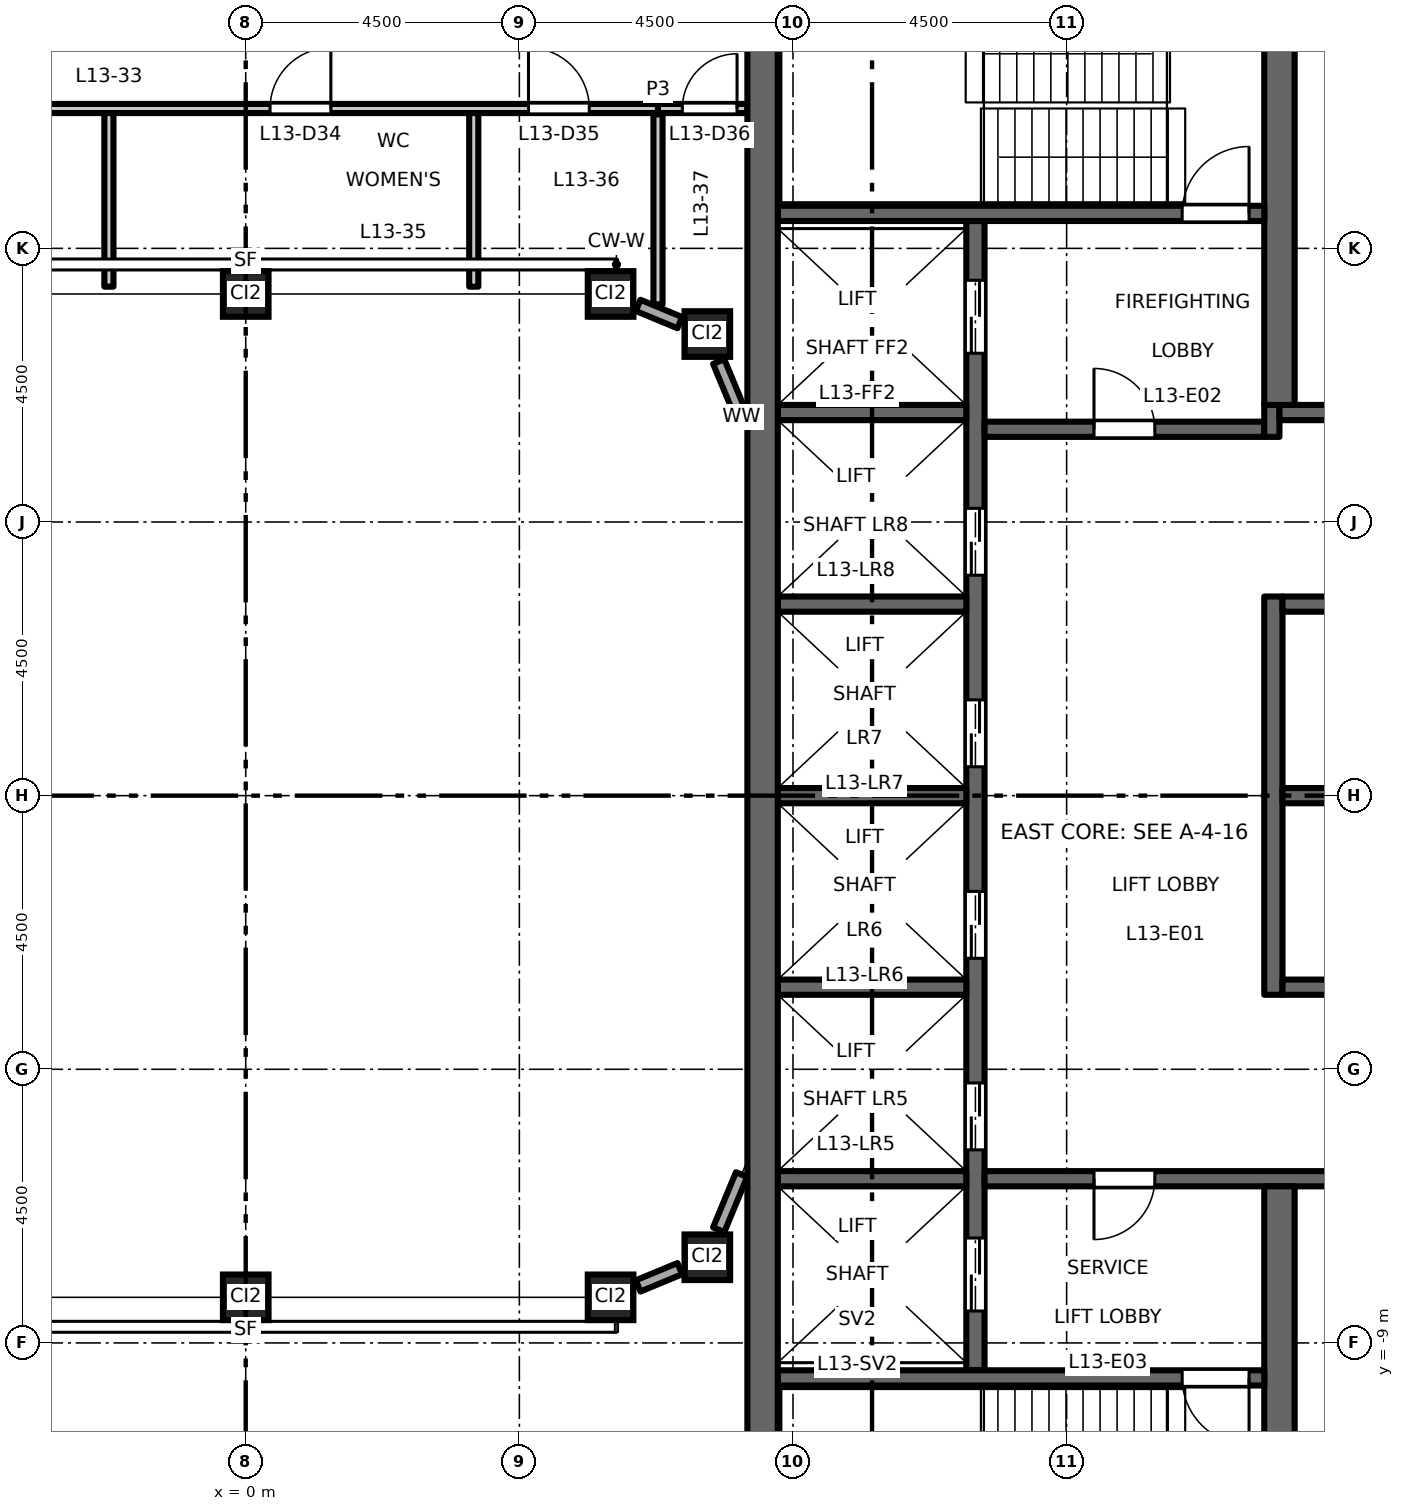
"""IFC4 building model, lengths in metres.
Left out: names, types, materials, properties, quantities, classifications, styles, units other than length and angle.
Written with IfcOpenShell. Run it as: python <this file> out.ifc"""

import sys

from ifc_helpers import new_model, si_unit, direction, frame, frame_2d, origin, origin_2d, place, context, subcontext, project, spatial, rectangle, hollow_rectangle, extrude, element, fill, save


model = new_model("IFC4")
c1 = context("Model", 3, precision=1e-05, world=origin(), true_north=direction((0.0, 1.0)))
c2 = subcontext(c1, "Body", "Model", "MODEL_VIEW")
j1 = project(units=[si_unit("LENGTHUNIT", "METRE"), si_unit("PLANEANGLEUNIT", "RADIAN")], contexts=[c1])
p1 = place(None, origin())
s1 = spatial("IfcSite", under=j1, at=p1, CompositionType="ELEMENT")
p2 = place(p1, origin())
s2 = spatial("IfcBuilding", under=s1, at=p2, CompositionType="ELEMENT")
p3 = place(p2, frame((0.0, 0.0, 62.7)))
s3 = spatial("IfcBuildingStorey", under=s2, at=p3, CompositionType="ELEMENT", Elevation=62.7)
for number, where, z_axis, x_axis in (
    (1, (0.0, -8.25, 0.0), (0.0, 0.0, 1.0), (1.0, 0.0, 0.0)),
    (2, (6.0, -8.25, 0.0), (0.0, 0.0, 1.0), (1.0, 0.0, 0.0)),
    (3, (7.591, -7.591, 0.0), (0.0, 0.0, 1.0), (1.0, 0.0, 0.0)),
    (4, (0.0, 8.25, 0.0), (0.0, 0.0, 1.0), (1.0, 0.0, 0.0)),
    (5, (6.0, 8.25, 0.0), (0.0, 0.0, 1.0), (1.0, 0.0, 0.0)),
    (6, (7.591, 7.591, 0.0), (0.0, 0.0, 1.0), (1.0, 0.0, 0.0)),
):
    element("IfcColumn", number, at=place(p3, frame(where, z_axis=z_axis, x_axis=x_axis)), inside=s3, PredefinedType="COLUMN", context=c2, shape_type="SweptSolid", body=[
        extrude(hollow_rectangle(XDim=0.75, YDim=0.75, WallThickness=0.045, at=origin_2d()), origin(), (0.0, 0.0, 1.0), 4.5),
    ])
p4 = place(p3, frame((12.0, -9.45, 0.0), z_axis=(0.0, 0.0, 1.0), x_axis=(0.0, 1.0, 0.0)))
e7 = element("IfcWall", 7, at=p4, inside=s3, PredefinedType="SHEAR", context=c2, shape_type="SweptSolid", body=[
    extrude(rectangle(XDim=18.9, YDim=0.3, at=frame_2d((9.45, 0.0))), origin(), (0.0, 0.0, 1.0), 4.35),
])
p5 = place(p4, frame((3.625, 0.0, 0.0)))
e8 = element("IfcOpeningElement", 8, at=p5, cuts=e7, PredefinedType="OPENING", context=c2, shape_type="SweptSolid", body=[
    extrude(rectangle(XDim=1.1, YDim=2.1, at=frame_2d((0.55, 1.05))), frame((0.0, 0.16, 0.0), z_axis=(0.0, -1.0, 0.0), x_axis=(1.0, 0.0, 0.0)), (0.0, 0.0, 1.0), 0.32),
])
p6 = place(p4, frame((6.775, 0.0, 0.0)))
e9 = element("IfcOpeningElement", 9, at=p6, cuts=e7, PredefinedType="OPENING", context=c2, shape_type="SweptSolid", body=[
    extrude(rectangle(XDim=1.1, YDim=2.1, at=frame_2d((0.55, 1.05))), frame((0.0, 0.16, 0.0), z_axis=(0.0, -1.0, 0.0), x_axis=(1.0, 0.0, 0.0)), (0.0, 0.0, 1.0), 0.32),
])
p7 = place(p4, frame((9.925, 0.0, 0.0)))
e10 = element("IfcOpeningElement", 10, at=p7, cuts=e7, PredefinedType="OPENING", context=c2, shape_type="SweptSolid", body=[
    extrude(rectangle(XDim=1.1, YDim=2.1, at=frame_2d((0.55, 1.05))), frame((0.0, 0.16, 0.0), z_axis=(0.0, -1.0, 0.0), x_axis=(1.0, 0.0, 0.0)), (0.0, 0.0, 1.0), 0.32),
])
p8 = place(p4, frame((13.075, 0.0, 0.0)))
e11 = element("IfcOpeningElement", 11, at=p8, cuts=e7, PredefinedType="OPENING", context=c2, shape_type="SweptSolid", body=[
    extrude(rectangle(XDim=1.1, YDim=2.1, at=frame_2d((0.55, 1.05))), frame((0.0, 0.16, 0.0), z_axis=(0.0, -1.0, 0.0), x_axis=(1.0, 0.0, 0.0)), (0.0, 0.0, 1.0), 0.32),
])
p9 = place(p4, frame((16.725, 0.0, 0.0)))
e12 = element("IfcOpeningElement", 12, at=p9, cuts=e7, PredefinedType="OPENING", context=c2, shape_type="SweptSolid", body=[
    extrude(rectangle(XDim=1.2, YDim=2.1, at=frame_2d((0.6, 1.05))), frame((0.0, 0.16, 0.0), z_axis=(0.0, -1.0, 0.0), x_axis=(1.0, 0.0, 0.0)), (0.0, 0.0, 1.0), 0.32),
])
p10 = place(p4, frame((0.975, 0.0, 0.0)))
e13 = element("IfcOpeningElement", 13, at=p10, cuts=e7, PredefinedType="OPENING", context=c2, shape_type="SweptSolid", body=[
    extrude(rectangle(XDim=1.2, YDim=2.1, at=frame_2d((0.6, 1.05))), frame((0.0, 0.16, 0.0), z_axis=(0.0, -1.0, 0.0), x_axis=(1.0, 0.0, 0.0)), (0.0, 0.0, 1.0), 0.32),
])
p11 = place(p3, frame((12.15, 6.025, 0.0), z_axis=(0.0, 0.0, 1.0), x_axis=(1.0, 0.0, 0.0)))
e14 = element("IfcWall", 14, at=p11, inside=s3, PredefinedType="SHEAR", context=c2, shape_type="SweptSolid", body=[
    extrude(rectangle(XDim=4.6, YDim=0.25, at=frame_2d((2.3, 0.0))), origin(), (0.0, 0.0, 1.0), 4.35),
])
p12 = place(p11, frame((1.8, 0.0, 0.0)))
e15 = element("IfcOpeningElement", 15, at=p12, cuts=e14, PredefinedType="OPENING", context=c2, shape_type="SweptSolid", body=[
    extrude(rectangle(XDim=1.0, YDim=2.1, at=frame_2d((0.5, 1.05))), frame((0.0, 0.135, 0.0), z_axis=(0.0, -1.0, 0.0), x_axis=(1.0, 0.0, 0.0)), (0.0, 0.0, 1.0), 0.27),
])
p13 = place(p3, frame((16.875, 5.9, 0.0), z_axis=(0.0, 0.0, 1.0), x_axis=(0.0, 1.0, 0.0)))
e16 = element("IfcWall", 16, at=p13, inside=s3, PredefinedType="SHEAR", context=c2, shape_type="SweptSolid", body=[
    extrude(rectangle(XDim=0.525, YDim=0.25, at=frame_2d((0.263, 0.0))), origin(), (0.0, 0.0, 1.0), 4.35),
])
p14 = place(p3, frame((17.0, 6.3, 0.0), z_axis=(0.0, 0.0, 1.0), x_axis=(1.0, 0.0, 0.0)))
e17 = element("IfcWall", 17, at=p14, inside=s3, PredefinedType="SHEAR", context=c2, shape_type="SweptSolid", body=[
    extrude(rectangle(XDim=4.25, YDim=0.25, at=frame_2d((2.125, 0.0))), origin(), (0.0, 0.0, 1.0), 4.35),
])
p15 = place(p14, frame((1.8, 0.0, 0.0)))
e18 = element("IfcOpeningElement", 18, at=p15, cuts=e17, PredefinedType="OPENING", context=c2, shape_type="SweptSolid", body=[
    extrude(rectangle(XDim=0.9, YDim=2.1, at=frame_2d((0.45, 1.05))), frame((0.0, 0.135, 0.0), z_axis=(0.0, -1.0, 0.0), x_axis=(1.0, 0.0, 0.0)), (0.0, 0.0, 1.0), 0.27),
])
p16 = place(p3, frame((12.15, -6.3, 0.0), z_axis=(0.0, 0.0, 1.0), x_axis=(1.0, 0.0, 0.0)))
e19 = element("IfcWall", 19, at=p16, inside=s3, PredefinedType="SHEAR", context=c2, shape_type="SweptSolid", body=[
    extrude(rectangle(XDim=9.1, YDim=0.25, at=frame_2d((4.55, 0.0))), origin(), (0.0, 0.0, 1.0), 4.35),
])
p17 = place(p16, frame((1.8, 0.0, 0.0)))
e20 = element("IfcOpeningElement", 20, at=p17, cuts=e19, PredefinedType="OPENING", context=c2, shape_type="SweptSolid", body=[
    extrude(rectangle(XDim=1.0, YDim=2.1, at=frame_2d((0.5, 1.05))), frame((0.0, 0.135, 0.0), z_axis=(0.0, -1.0, 0.0), x_axis=(1.0, 0.0, 0.0)), (0.0, 0.0, 1.0), 0.27),
])
p18 = place(p3, frame((16.9, -3.275, 0.0), z_axis=(0.0, 0.0, 1.0), x_axis=(0.0, 1.0, 0.0)))
e21 = element("IfcWall", 21, at=p18, inside=s3, PredefinedType="SHEAR", context=c2, shape_type="SweptSolid", body=[
    extrude(rectangle(XDim=6.55, YDim=0.3, at=frame_2d((3.275, 0.0))), origin(), (0.0, 0.0, 1.0), 4.35),
])
for number, where, z_axis, x_axis in (
    (22, (17.05, 0.0, 0.0), (0.0, 0.0, 1.0), (1.0, 0.0, 0.0)),
    (23, (17.05, 3.15, 0.0), (0.0, 0.0, 1.0), (1.0, 0.0, 0.0)),
    (24, (17.05, -3.15, 0.0), (0.0, 0.0, 1.0), (1.0, 0.0, 0.0)),
):
    element("IfcWall", number, at=place(p3, frame(where, z_axis=z_axis, x_axis=x_axis)), inside=s3, PredefinedType="SHEAR", context=c2, shape_type="SweptSolid", body=[
        extrude(rectangle(XDim=4.2, YDim=0.25, at=frame_2d((2.1, 0.0))), origin(), (0.0, 0.0, 1.0), 4.35),
    ])
for number, where, z_axis, x_axis in (
    (25, (17.0, 6.425, 0.0), (0.0, 0.0, 1.0), (0.0, 1.0, 0.0)),
    (26, (17.0, -13.0, 0.0), (0.0, 0.0, 1.0), (0.0, 1.0, 0.0)),
):
    element("IfcWall", number, at=place(p3, frame(where, z_axis=z_axis, x_axis=x_axis)), inside=s3, PredefinedType="SHEAR", context=c2, shape_type="SweptSolid", body=[
        extrude(rectangle(XDim=6.575, YDim=0.5, at=frame_2d((3.288, 0.0))), origin(), (0.0, 0.0, 1.0), 4.35),
    ])
for number, where, z_axis, x_axis in (
    (27, (8.75, 0.0, 0.0), (0.0, 0.0, 1.0), (1.0, 0.0, 0.0)),
    (28, (8.75, 3.15, 0.0), (0.0, 0.0, 1.0), (1.0, 0.0, 0.0)),
    (29, (8.75, 6.3, 0.0), (0.0, 0.0, 1.0), (1.0, 0.0, 0.0)),
    (30, (8.75, -3.15, 0.0), (0.0, 0.0, 1.0), (1.0, 0.0, 0.0)),
    (31, (8.75, -6.3, 0.0), (0.0, 0.0, 1.0), (1.0, 0.0, 0.0)),
):
    element("IfcWall", number, at=place(p3, frame(where, z_axis=z_axis, x_axis=x_axis)), inside=s3, PredefinedType="SHEAR", context=c2, shape_type="SweptSolid", body=[
        extrude(rectangle(XDim=3.1, YDim=0.25, at=frame_2d((1.55, 0.0))), origin(), (0.0, 0.0, 1.0), 4.35),
    ])
p19 = place(p3, frame((8.75, 9.575, 0.0), z_axis=(0.0, 0.0, 1.0), x_axis=(1.0, 0.0, 0.0)))
e32 = element("IfcWall", 32, at=p19, inside=s3, PredefinedType="SHEAR", context=c2, shape_type="SweptSolid", body=[
    extrude(rectangle(XDim=8.0, YDim=0.25, at=frame_2d((4.0, 0.0))), origin(), (0.0, 0.0, 1.0), 4.35),
])
p20 = place(p19, frame((6.65, 0.0, 0.0)))
e33 = element("IfcOpeningElement", 33, at=p20, cuts=e32, PredefinedType="OPENING", context=c2, shape_type="SweptSolid", body=[
    extrude(rectangle(XDim=1.1, YDim=2.1, at=frame_2d((0.55, 1.05))), frame((0.0, 0.135, 0.0), z_axis=(0.0, -1.0, 0.0), x_axis=(1.0, 0.0, 0.0)), (0.0, 0.0, 1.0), 0.27),
])
p21 = place(p3, frame((8.75, -9.575, 0.0), z_axis=(0.0, 0.0, 1.0), x_axis=(1.0, 0.0, 0.0)))
e34 = element("IfcWall", 34, at=p21, inside=s3, PredefinedType="SHEAR", context=c2, shape_type="SweptSolid", body=[
    extrude(rectangle(XDim=8.0, YDim=0.25, at=frame_2d((4.0, 0.0))), origin(), (0.0, 0.0, 1.0), 4.35),
])
p22 = place(p21, frame((6.65, 0.0, 0.0)))
e35 = element("IfcOpeningElement", 35, at=p22, cuts=e34, PredefinedType="OPENING", context=c2, shape_type="SweptSolid", body=[
    extrude(rectangle(XDim=1.1, YDim=2.1, at=frame_2d((0.55, 1.05))), frame((0.0, 0.135, 0.0), z_axis=(0.0, -1.0, 0.0), x_axis=(1.0, 0.0, 0.0)), (0.0, 0.0, 1.0), 0.27),
])
p23 = place(p3, frame((8.5, -13.0, 0.0), z_axis=(0.0, 0.0, 1.0), x_axis=(0.0, 1.0, 0.0)))
e36 = element("IfcWall", 36, at=p23, inside=s3, PredefinedType="SHEAR", context=c2, shape_type="SweptSolid", body=[
    extrude(rectangle(XDim=26.0, YDim=0.5, at=frame_2d((13.0, 0.0))), origin(), (0.0, 0.0, 1.0), 4.35),
])
p24 = place(p3, frame((6.453, -8.062, 0.0), z_axis=(0.0, 0.0, 1.0), x_axis=(0.923940677943, 0.382535780864, 0.0)))
e37 = element("IfcWall", 37, at=p24, inside=s3, PredefinedType="STANDARD", context=c2, shape_type="SweptSolid", body=[
    extrude(rectangle(XDim=0.742, YDim=0.2, at=frame_2d((0.371, 0.0))), origin(), (0.0, 0.0, 1.0), 3.73),
])
for number, where, z_axis, x_axis in (
    (38, (7.779, -7.138, 0.0), (0.0, 0.0, 1.0), (0.383, 0.924, 0.0)),
    (39, (8.154, 6.231, 0.0), (0.0, 0.0, 1.0), (-0.383, 0.924, 0.0)),
):
    element("IfcWall", number, at=place(p3, frame(where, z_axis=z_axis, x_axis=x_axis)), inside=s3, PredefinedType="STANDARD", context=c2, shape_type="SweptSolid", body=[
        extrude(rectangle(XDim=0.982, YDim=0.2, at=frame_2d((0.491, 0.0))), origin(), (0.0, 0.0, 1.0), 3.73),
    ])
p25 = place(p3, frame((7.138, 7.779, 0.0), z_axis=(0.0, 0.0, 1.0), x_axis=(-0.923940677943, 0.382535780864, 0.0)))
e40 = element("IfcWall", 40, at=p25, inside=s3, PredefinedType="STANDARD", context=c2, shape_type="SweptSolid", body=[
    extrude(rectangle(XDim=0.742, YDim=0.2, at=frame_2d((0.371, 0.0))), origin(), (0.0, 0.0, 1.0), 3.73),
])
p26 = place(p3, frame((-8.25, 11.3, 0.0), z_axis=(0.0, 0.0, 1.0), x_axis=(1.0, 0.0, 0.0)))
e41 = element("IfcWall", 41, at=p26, inside=s3, PredefinedType="PARTITIONING", context=c2, shape_type="SweptSolid", body=[
    extrude(rectangle(XDim=15.03, YDim=0.15, at=frame_2d((7.515, 0.0))), origin(), (0.0, 0.0, 1.0), 4.35),
])
p27 = place(p26, frame((2.4, 0.0, 0.0)))
e42 = element("IfcOpeningElement", 42, at=p27, cuts=e41, PredefinedType="OPENING", context=c2, shape_type="SweptSolid", body=[
    extrude(rectangle(XDim=1.0, YDim=2.1, at=frame_2d((0.5, 1.05))), frame((0.0, 0.085, 0.0), z_axis=(0.0, -1.0, 0.0), x_axis=(1.0, 0.0, 0.0)), (0.0, 0.0, 1.0), 0.17),
])
p28 = place(p26, frame((8.65, 0.0, 0.0)))
e43 = element("IfcOpeningElement", 43, at=p28, cuts=e41, PredefinedType="OPENING", context=c2, shape_type="SweptSolid", body=[
    extrude(rectangle(XDim=1.0, YDim=2.1, at=frame_2d((0.5, 1.05))), frame((0.0, 0.085, 0.0), z_axis=(0.0, -1.0, 0.0), x_axis=(1.0, 0.0, 0.0)), (0.0, 0.0, 1.0), 0.17),
])
p29 = place(p26, frame((12.9, 0.0, 0.0)))
e44 = element("IfcOpeningElement", 44, at=p29, cuts=e41, PredefinedType="OPENING", context=c2, shape_type="SweptSolid", body=[
    extrude(rectangle(XDim=1.0, YDim=2.1, at=frame_2d((0.5, 1.05))), frame((0.0, 0.085, 0.0), z_axis=(0.0, -1.0, 0.0), x_axis=(1.0, 0.0, 0.0)), (0.0, 0.0, 1.0), 0.17),
])
p30 = place(p3, frame((6.78, 11.3, 0.0), z_axis=(0.0, 0.0, 1.0), x_axis=(1.0, 0.0, 0.0)))
e45 = element("IfcWall", 45, at=p30, inside=s3, PredefinedType="PARTITIONING", context=c2, shape_type="SweptSolid", body=[
    extrude(rectangle(XDim=1.47, YDim=0.15, at=frame_2d((0.735, 0.0))), origin(), (0.0, 0.0, 1.0), 4.35),
])
p31 = place(p30, frame((0.4, 0.0, 0.0)))
e46 = element("IfcOpeningElement", 46, at=p31, cuts=e45, PredefinedType="OPENING", context=c2, shape_type="SweptSolid", body=[
    extrude(rectangle(XDim=0.9, YDim=2.1, at=frame_2d((0.45, 1.05))), frame((0.0, 0.085, 0.0), z_axis=(0.0, -1.0, 0.0), x_axis=(1.0, 0.0, 0.0)), (0.0, 0.0, 1.0), 0.17),
])
for number, where, z_axis, x_axis in (
    (47, (-2.25, 8.37, 0.0), (0.0, 0.0, 1.0), (0.0, 1.0, 0.0)),
    (48, (3.75, 8.37, 0.0), (0.0, 0.0, 1.0), (0.0, 1.0, 0.0)),
):
    element("IfcWall", number, at=place(p3, frame(where, z_axis=z_axis, x_axis=x_axis)), inside=s3, PredefinedType="PARTITIONING", context=c2, shape_type="SweptSolid", body=[
        extrude(rectangle(XDim=2.855, YDim=0.15, at=frame_2d((1.427, 0.0))), origin(), (0.0, 0.0, 1.0), 4.35),
    ])
p32 = place(p3, frame((6.78, 8.079, 0.0), z_axis=(0.0, 0.0, 1.0), x_axis=(0.0, 1.0, 0.0)))
e49 = element("IfcWall", 49, at=p32, inside=s3, PredefinedType="PARTITIONING", context=c2, shape_type="SweptSolid", body=[
    extrude(rectangle(XDim=3.146, YDim=0.15, at=frame_2d((1.573, 0.0))), origin(), (0.0, 0.0, 1.0), 4.35),
])
p33 = place(p12, origin())
e50 = element("IfcDoor", 50, at=p33, inside=s3, OperationType="SINGLE_SWING_RIGHT", PredefinedType="DOOR", context=c2, shape_type="SweptSolid", body=[
    extrude(rectangle(XDim=1.0, YDim=2.1, at=frame_2d((0.5, 1.05))), frame((0.0, 0.025, 0.0), z_axis=(0.0, -1.0, 0.0), x_axis=(1.0, 0.0, 0.0)), (0.0, 0.0, 1.0), 0.05),
])
fill(e15, e50)
p34 = place(p17, origin())
e51 = element("IfcDoor", 51, at=p34, inside=s3, OperationType="SINGLE_SWING_LEFT", PredefinedType="DOOR", context=c2, shape_type="SweptSolid", body=[
    extrude(rectangle(XDim=1.0, YDim=2.1, at=frame_2d((0.5, 1.05))), frame((0.0, 0.025, 0.0), z_axis=(0.0, -1.0, 0.0), x_axis=(1.0, 0.0, 0.0)), (0.0, 0.0, 1.0), 0.05),
])
fill(e20, e51)
p35 = place(p20, origin())
e52 = element("IfcDoor", 52, at=p35, inside=s3, OperationType="SINGLE_SWING_LEFT", PredefinedType="DOOR", context=c2, shape_type="SweptSolid", body=[
    extrude(rectangle(XDim=1.1, YDim=2.1, at=frame_2d((0.55, 1.05))), frame((0.0, 0.025, 0.0), z_axis=(0.0, -1.0, 0.0), x_axis=(1.0, 0.0, 0.0)), (0.0, 0.0, 1.0), 0.05),
])
fill(e33, e52)
p36 = place(p22, origin())
e53 = element("IfcDoor", 53, at=p36, inside=s3, OperationType="SINGLE_SWING_RIGHT", PredefinedType="DOOR", context=c2, shape_type="SweptSolid", body=[
    extrude(rectangle(XDim=1.1, YDim=2.1, at=frame_2d((0.55, 1.05))), frame((0.0, 0.025, 0.0), z_axis=(0.0, -1.0, 0.0), x_axis=(1.0, 0.0, 0.0)), (0.0, 0.0, 1.0), 0.05),
])
fill(e35, e53)
p37 = place(p5, origin())
e54 = element("IfcDoor", 54, at=p37, inside=s3, OperationType="DOUBLE_DOOR_SLIDING", PredefinedType="DOOR", context=c2, shape_type="SweptSolid", body=[
    extrude(rectangle(XDim=1.1, YDim=2.1, at=frame_2d((0.55, 1.05))), frame((0.0, 0.025, 0.0), z_axis=(0.0, -1.0, 0.0), x_axis=(1.0, 0.0, 0.0)), (0.0, 0.0, 1.0), 0.05),
])
fill(e8, e54)
p38 = place(p6, origin())
e55 = element("IfcDoor", 55, at=p38, inside=s3, OperationType="DOUBLE_DOOR_SLIDING", PredefinedType="DOOR", context=c2, shape_type="SweptSolid", body=[
    extrude(rectangle(XDim=1.1, YDim=2.1, at=frame_2d((0.55, 1.05))), frame((0.0, 0.025, 0.0), z_axis=(0.0, -1.0, 0.0), x_axis=(1.0, 0.0, 0.0)), (0.0, 0.0, 1.0), 0.05),
])
fill(e9, e55)
p39 = place(p7, origin())
e56 = element("IfcDoor", 56, at=p39, inside=s3, OperationType="DOUBLE_DOOR_SLIDING", PredefinedType="DOOR", context=c2, shape_type="SweptSolid", body=[
    extrude(rectangle(XDim=1.1, YDim=2.1, at=frame_2d((0.55, 1.05))), frame((0.0, 0.025, 0.0), z_axis=(0.0, -1.0, 0.0), x_axis=(1.0, 0.0, 0.0)), (0.0, 0.0, 1.0), 0.05),
])
fill(e10, e56)
p40 = place(p8, origin())
e57 = element("IfcDoor", 57, at=p40, inside=s3, OperationType="DOUBLE_DOOR_SLIDING", PredefinedType="DOOR", context=c2, shape_type="SweptSolid", body=[
    extrude(rectangle(XDim=1.1, YDim=2.1, at=frame_2d((0.55, 1.05))), frame((0.0, 0.025, 0.0), z_axis=(0.0, -1.0, 0.0), x_axis=(1.0, 0.0, 0.0)), (0.0, 0.0, 1.0), 0.05),
])
fill(e11, e57)
p41 = place(p9, origin())
e58 = element("IfcDoor", 58, at=p41, inside=s3, OperationType="DOUBLE_DOOR_SLIDING", PredefinedType="DOOR", context=c2, shape_type="SweptSolid", body=[
    extrude(rectangle(XDim=1.2, YDim=2.1, at=frame_2d((0.6, 1.05))), frame((0.0, 0.025, 0.0), z_axis=(0.0, -1.0, 0.0), x_axis=(1.0, 0.0, 0.0)), (0.0, 0.0, 1.0), 0.05),
])
fill(e12, e58)
p42 = place(p10, origin())
e59 = element("IfcDoor", 59, at=p42, inside=s3, OperationType="DOUBLE_DOOR_SLIDING", PredefinedType="DOOR", context=c2, shape_type="SweptSolid", body=[
    extrude(rectangle(XDim=1.2, YDim=2.1, at=frame_2d((0.6, 1.05))), frame((0.0, 0.025, 0.0), z_axis=(0.0, -1.0, 0.0), x_axis=(1.0, 0.0, 0.0)), (0.0, 0.0, 1.0), 0.05),
])
fill(e13, e59)
p43 = place(p28, origin())
e60 = element("IfcDoor", 60, at=p43, inside=s3, OperationType="SINGLE_SWING_RIGHT", PredefinedType="DOOR", context=c2, shape_type="SweptSolid", body=[
    extrude(rectangle(XDim=1.0, YDim=2.1, at=frame_2d((0.5, 1.05))), frame((0.0, 0.025, 0.0), z_axis=(0.0, -1.0, 0.0), x_axis=(1.0, 0.0, 0.0)), (0.0, 0.0, 1.0), 0.05),
])
fill(e43, e60)
p44 = place(p29, origin())
e61 = element("IfcDoor", 61, at=p44, inside=s3, OperationType="SINGLE_SWING_LEFT", PredefinedType="DOOR", context=c2, shape_type="SweptSolid", body=[
    extrude(rectangle(XDim=1.0, YDim=2.1, at=frame_2d((0.5, 1.05))), frame((0.0, 0.025, 0.0), z_axis=(0.0, -1.0, 0.0), x_axis=(1.0, 0.0, 0.0)), (0.0, 0.0, 1.0), 0.05),
])
fill(e44, e61)
p45 = place(p31, origin())
e62 = element("IfcDoor", 62, at=p45, inside=s3, OperationType="SINGLE_SWING_RIGHT", PredefinedType="DOOR", context=c2, shape_type="SweptSolid", body=[
    extrude(rectangle(XDim=0.9, YDim=2.1, at=frame_2d((0.45, 1.05))), frame((0.0, 0.025, 0.0), z_axis=(0.0, -1.0, 0.0), x_axis=(1.0, 0.0, 0.0)), (0.0, 0.0, 1.0), 0.05),
])
fill(e46, e62)
save(model, sys.argv[1])
